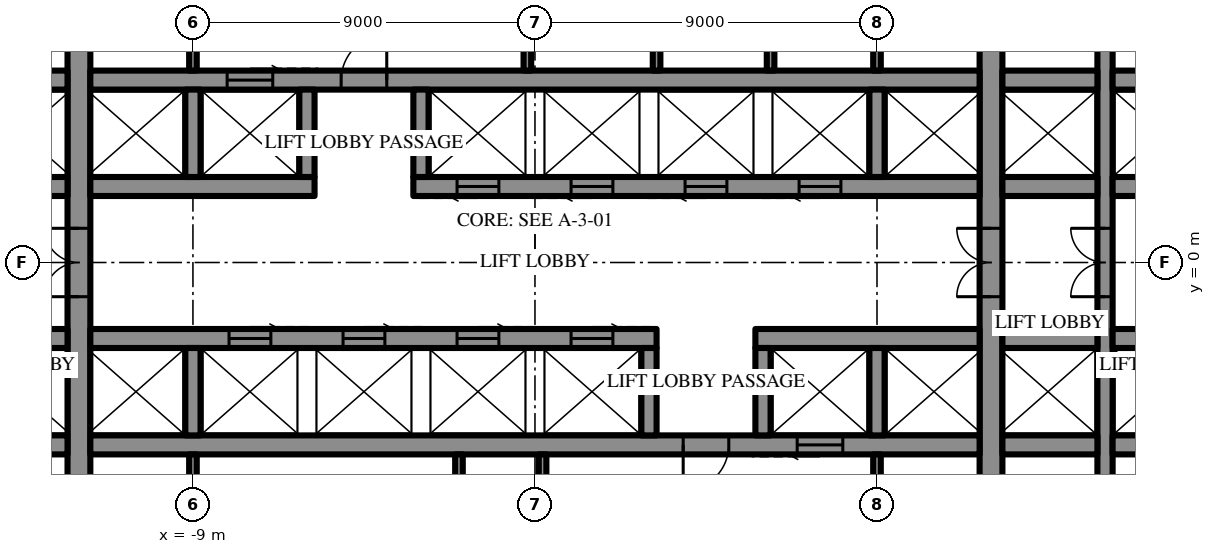
"""IFC4 building model, lengths in metres.
Left out: names, types, materials, properties, quantities, classifications, styles, units other than length and angle.
Written with IfcOpenShell. Run it as: python <this file> out.ifc"""

import sys

from ifc_helpers import new_model, si_unit, direction, frame, frame_2d, origin, place, context, subcontext, project, spatial, rectangle, extrude, element, fill, save


model = new_model("IFC4")
c1 = context("Model", 3, precision=1e-05, world=origin(), true_north=direction((0.0, 1.0)))
c2 = subcontext(c1, "Body", "Model", "MODEL_VIEW")
j1 = project(units=[si_unit("LENGTHUNIT", "METRE"), si_unit("PLANEANGLEUNIT", "RADIAN")], contexts=[c1])
p1 = place(None, origin())
s1 = spatial("IfcSite", under=j1, at=p1, CompositionType="ELEMENT")
p2 = place(p1, origin())
s2 = spatial("IfcBuilding", under=s1, at=p2, CompositionType="ELEMENT")
p3 = place(p2, frame((0.0, 0.0, 61.3)))
s3 = spatial("IfcBuildingStorey", under=s2, at=p3, CompositionType="ELEMENT", Elevation=61.3)
p4 = place(p3, frame((12.0, -10.7, 0.0), z_axis=(0.0, 0.0, 1.0), x_axis=(0.0, 1.0, 0.0)))
e1 = element("IfcWall", 1, at=p4, inside=s3, PredefinedType="SHEAR", context=c2, shape_type="SweptSolid", body=[
    extrude(rectangle(XDim=21.4, YDim=0.6, at=frame_2d((10.7, 0.0))), origin(), (0.0, 0.0, 1.0), 4.2),
])
p5 = place(p4, frame((9.8, 0.0, 0.0)))
e2 = element("IfcOpeningElement", 2, at=p5, cuts=e1, PredefinedType="OPENING", context=c2, shape_type="SweptSolid", body=[
    extrude(rectangle(XDim=1.8, YDim=2.4, at=frame_2d((0.9, 1.2))), frame((0.0, 0.31, 0.0), z_axis=(0.0, -1.0, 0.0), x_axis=(1.0, 0.0, 0.0)), (0.0, 0.0, 1.0), 0.62),
])
p6 = place(p3, frame((-12.0, -10.7, 0.0), z_axis=(0.0, 0.0, 1.0), x_axis=(0.0, 1.0, 0.0)))
e3 = element("IfcWall", 3, at=p6, inside=s3, PredefinedType="SHEAR", context=c2, shape_type="SweptSolid", body=[
    extrude(rectangle(XDim=21.4, YDim=0.6, at=frame_2d((10.7, 0.0))), origin(), (0.0, 0.0, 1.0), 4.2),
])
p7 = place(p6, frame((9.8, 0.0, 0.0)))
e4 = element("IfcOpeningElement", 4, at=p7, cuts=e3, PredefinedType="OPENING", context=c2, shape_type="SweptSolid", body=[
    extrude(rectangle(XDim=1.8, YDim=2.4, at=frame_2d((0.9, 1.2))), frame((0.0, 0.31, 0.0), z_axis=(0.0, -1.0, 0.0), x_axis=(1.0, 0.0, 0.0)), (0.0, 0.0, 1.0), 0.62),
])
p8 = place(p3, frame((15.0, -10.7, 0.0), z_axis=(0.0, 0.0, 1.0), x_axis=(0.0, 1.0, 0.0)))
e5 = element("IfcWall", 5, at=p8, inside=s3, PredefinedType="SHEAR", context=c2, shape_type="SweptSolid", body=[
    extrude(rectangle(XDim=21.4, YDim=0.4, at=frame_2d((10.7, 0.0))), origin(), (0.0, 0.0, 1.0), 4.2),
])
p9 = place(p8, frame((9.8, 0.0, 0.0)))
e6 = element("IfcOpeningElement", 6, at=p9, cuts=e5, PredefinedType="OPENING", context=c2, shape_type="SweptSolid", body=[
    extrude(rectangle(XDim=1.8, YDim=2.4, at=frame_2d((0.9, 1.2))), frame((0.0, 0.21, 0.0), z_axis=(0.0, -1.0, 0.0), x_axis=(1.0, 0.0, 0.0)), (0.0, 0.0, 1.0), 0.42),
])
p10 = place(p3, frame((-14.8, 2.0, 0.0), z_axis=(0.0, 0.0, 1.0), x_axis=(1.0, 0.0, 0.0)))
e7 = element("IfcWall", 7, at=p10, inside=s3, PredefinedType="SHEAR", context=c2, shape_type="SweptSolid", body=[
    extrude(rectangle(XDim=2.5, YDim=0.5, at=frame_2d((1.25, 0.0))), origin(), (0.0, 0.0, 1.0), 4.2),
])
p11 = place(p3, frame((-11.7, 2.0, 0.0), z_axis=(0.0, 0.0, 1.0), x_axis=(1.0, 0.0, 0.0)))
e8 = element("IfcWall", 8, at=p11, inside=s3, PredefinedType="SHEAR", context=c2, shape_type="SweptSolid", body=[
    extrude(rectangle(XDim=5.9, YDim=0.5, at=frame_2d((2.95, 0.0))), origin(), (0.0, 0.0, 1.0), 4.2),
])
p12 = place(p3, frame((-3.2, 2.0, 0.0), z_axis=(0.0, 0.0, 1.0), x_axis=(1.0, 0.0, 0.0)))
e9 = element("IfcWall", 9, at=p12, inside=s3, PredefinedType="SHEAR", context=c2, shape_type="SweptSolid", body=[
    extrude(rectangle(XDim=14.9, YDim=0.5, at=frame_2d((7.45, 0.0))), origin(), (0.0, 0.0, 1.0), 4.2),
])
p13 = place(p12, frame((1.15, 0.0, 0.0)))
e10 = element("IfcOpeningElement", 10, at=p13, cuts=e9, PredefinedType="OPENING", context=c2, shape_type="SweptSolid", body=[
    extrude(rectangle(XDim=1.1, YDim=2.2, at=frame_2d((0.55, 1.1))), frame((0.0, 0.26, 0.0), z_axis=(0.0, -1.0, 0.0), x_axis=(1.0, 0.0, 0.0)), (0.0, 0.0, 1.0), 0.52),
])
p14 = place(p12, frame((4.15, 0.0, 0.0)))
e11 = element("IfcOpeningElement", 11, at=p14, cuts=e9, PredefinedType="OPENING", context=c2, shape_type="SweptSolid", body=[
    extrude(rectangle(XDim=1.1, YDim=2.2, at=frame_2d((0.55, 1.1))), frame((0.0, 0.26, 0.0), z_axis=(0.0, -1.0, 0.0), x_axis=(1.0, 0.0, 0.0)), (0.0, 0.0, 1.0), 0.52),
])
p15 = place(p12, frame((7.15, 0.0, 0.0)))
e12 = element("IfcOpeningElement", 12, at=p15, cuts=e9, PredefinedType="OPENING", context=c2, shape_type="SweptSolid", body=[
    extrude(rectangle(XDim=1.1, YDim=2.2, at=frame_2d((0.55, 1.1))), frame((0.0, 0.26, 0.0), z_axis=(0.0, -1.0, 0.0), x_axis=(1.0, 0.0, 0.0)), (0.0, 0.0, 1.0), 0.52),
])
p16 = place(p12, frame((10.15, 0.0, 0.0)))
e13 = element("IfcOpeningElement", 13, at=p16, cuts=e9, PredefinedType="OPENING", context=c2, shape_type="SweptSolid", body=[
    extrude(rectangle(XDim=1.1, YDim=2.2, at=frame_2d((0.55, 1.1))), frame((0.0, 0.26, 0.0), z_axis=(0.0, -1.0, 0.0), x_axis=(1.0, 0.0, 0.0)), (0.0, 0.0, 1.0), 0.52),
])
p17 = place(p3, frame((12.3, 2.0, 0.0), z_axis=(0.0, 0.0, 1.0), x_axis=(1.0, 0.0, 0.0)))
e14 = element("IfcWall", 14, at=p17, inside=s3, PredefinedType="SHEAR", context=c2, shape_type="SweptSolid", body=[
    extrude(rectangle(XDim=2.5, YDim=0.5, at=frame_2d((1.25, 0.0))), origin(), (0.0, 0.0, 1.0), 4.2),
])
p18 = place(p3, frame((15.2, 2.0, 0.0), z_axis=(0.0, 0.0, 1.0), x_axis=(1.0, 0.0, 0.0)))
e15 = element("IfcWall", 15, at=p18, inside=s3, PredefinedType="SHEAR", context=c2, shape_type="SweptSolid", body=[
    extrude(rectangle(XDim=2.2, YDim=0.5, at=frame_2d((1.1, 0.0))), origin(), (0.0, 0.0, 1.0), 4.2),
])
p19 = place(p3, frame((-14.8, 4.8, 0.0), z_axis=(0.0, 0.0, 1.0), x_axis=(1.0, 0.0, 0.0)))
e16 = element("IfcWall", 16, at=p19, inside=s3, PredefinedType="SHEAR", context=c2, shape_type="SweptSolid", body=[
    extrude(rectangle(XDim=2.5, YDim=0.5, at=frame_2d((1.25, 0.0))), origin(), (0.0, 0.0, 1.0), 4.2),
])
p20 = place(p3, frame((-11.7, 4.8, 0.0), z_axis=(0.0, 0.0, 1.0), x_axis=(1.0, 0.0, 0.0)))
e17 = element("IfcWall", 17, at=p20, inside=s3, PredefinedType="SHEAR", context=c2, shape_type="SweptSolid", body=[
    extrude(rectangle(XDim=23.4, YDim=0.5, at=frame_2d((11.7, 0.0))), origin(), (0.0, 0.0, 1.0), 4.2),
])
p21 = place(p20, frame((6.6, 0.0, 0.0)))
e18 = element("IfcOpeningElement", 18, at=p21, cuts=e17, PredefinedType="OPENING", context=c2, shape_type="SweptSolid", body=[
    extrude(rectangle(XDim=1.2, YDim=2.2, at=frame_2d((0.6, 1.1))), frame((0.0, 0.26, 0.0), z_axis=(0.0, -1.0, 0.0), x_axis=(1.0, 0.0, 0.0)), (0.0, 0.0, 1.0), 0.52),
])
p22 = place(p20, frame((3.6, 0.0, 0.0)))
e19 = element("IfcOpeningElement", 19, at=p22, cuts=e17, PredefinedType="OPENING", context=c2, shape_type="SweptSolid", body=[
    extrude(rectangle(XDim=1.2, YDim=2.2, at=frame_2d((0.6, 1.1))), frame((0.0, 0.26, 0.0), z_axis=(0.0, -1.0, 0.0), x_axis=(1.0, 0.0, 0.0)), (0.0, 0.0, 1.0), 0.52),
])
p23 = place(p3, frame((12.3, 4.8, 0.0), z_axis=(0.0, 0.0, 1.0), x_axis=(1.0, 0.0, 0.0)))
e20 = element("IfcWall", 20, at=p23, inside=s3, PredefinedType="SHEAR", context=c2, shape_type="SweptSolid", body=[
    extrude(rectangle(XDim=2.5, YDim=0.5, at=frame_2d((1.25, 0.0))), origin(), (0.0, 0.0, 1.0), 4.2),
])
p24 = place(p3, frame((15.2, 4.8, 0.0), z_axis=(0.0, 0.0, 1.0), x_axis=(1.0, 0.0, 0.0)))
e21 = element("IfcWall", 21, at=p24, inside=s3, PredefinedType="SHEAR", context=c2, shape_type="SweptSolid", body=[
    extrude(rectangle(XDim=2.2, YDim=0.5, at=frame_2d((1.1, 0.0))), origin(), (0.0, 0.0, 1.0), 4.2),
])
for number, where, z_axis, x_axis in (
    (22, (-9.0, 2.25, 0.0), (0.0, 0.0, 1.0), (0.0, 1.0, 0.0)),
    (23, (-6.0, 2.25, 0.0), (0.0, 0.0, 1.0), (0.0, 1.0, 0.0)),
    (24, (-3.0, 2.25, 0.0), (0.0, 0.0, 1.0), (0.0, 1.0, 0.0)),
    (25, (9.0, 2.25, 0.0), (0.0, 0.0, 1.0), (0.0, 1.0, 0.0)),
):
    element("IfcWall", number, at=place(p3, frame(where, z_axis=z_axis, x_axis=x_axis)), inside=s3, PredefinedType="SHEAR", context=c2, shape_type="SweptSolid", body=[
        extrude(rectangle(XDim=2.3, YDim=0.4, at=frame_2d((1.15, 0.0))), origin(), (0.0, 0.0, 1.0), 4.2),
    ])
p25 = place(p3, frame((-0.2, 5.05, 0.0), z_axis=(0.0, 0.0, 1.0), x_axis=(0.0, 1.0, 0.0)))
e26 = element("IfcWall", 26, at=p25, inside=s3, PredefinedType="SHEAR", context=c2, shape_type="SweptSolid", body=[
    extrude(rectangle(XDim=5.65, YDim=0.2, at=frame_2d((2.825, 0.0))), origin(), (0.0, 0.0, 1.0), 4.2),
])
p26 = place(p3, frame((17.4, -2.0, 0.0), z_axis=(0.0, 0.0, 1.0), x_axis=(-1.0, 0.0, 0.0)))
e27 = element("IfcWall", 27, at=p26, inside=s3, PredefinedType="SHEAR", context=c2, shape_type="SweptSolid", body=[
    extrude(rectangle(XDim=2.2, YDim=0.5, at=frame_2d((1.1, 0.0))), origin(), (0.0, 0.0, 1.0), 4.2),
])
p27 = place(p3, frame((14.8, -2.0, 0.0), z_axis=(0.0, 0.0, 1.0), x_axis=(-1.0, 0.0, 0.0)))
e28 = element("IfcWall", 28, at=p27, inside=s3, PredefinedType="SHEAR", context=c2, shape_type="SweptSolid", body=[
    extrude(rectangle(XDim=2.5, YDim=0.5, at=frame_2d((1.25, 0.0))), origin(), (0.0, 0.0, 1.0), 4.2),
])
p28 = place(p3, frame((11.7, -2.0, 0.0), z_axis=(0.0, 0.0, 1.0), x_axis=(-1.0, 0.0, 0.0)))
e29 = element("IfcWall", 29, at=p28, inside=s3, PredefinedType="SHEAR", context=c2, shape_type="SweptSolid", body=[
    extrude(rectangle(XDim=5.9, YDim=0.5, at=frame_2d((2.95, 0.0))), origin(), (0.0, 0.0, 1.0), 4.2),
])
p29 = place(p3, frame((3.2, -2.0, 0.0), z_axis=(0.0, 0.0, 1.0), x_axis=(-1.0, 0.0, 0.0)))
e30 = element("IfcWall", 30, at=p29, inside=s3, PredefinedType="SHEAR", context=c2, shape_type="SweptSolid", body=[
    extrude(rectangle(XDim=14.9, YDim=0.5, at=frame_2d((7.45, 0.0))), origin(), (0.0, 0.0, 1.0), 4.2),
])
p30 = place(p29, frame((1.15, 0.0, 0.0)))
e31 = element("IfcOpeningElement", 31, at=p30, cuts=e30, PredefinedType="OPENING", context=c2, shape_type="SweptSolid", body=[
    extrude(rectangle(XDim=1.1, YDim=2.2, at=frame_2d((0.55, 1.1))), frame((0.0, 0.26, 0.0), z_axis=(0.0, -1.0, 0.0), x_axis=(1.0, 0.0, 0.0)), (0.0, 0.0, 1.0), 0.52),
])
p31 = place(p29, frame((4.15, 0.0, 0.0)))
e32 = element("IfcOpeningElement", 32, at=p31, cuts=e30, PredefinedType="OPENING", context=c2, shape_type="SweptSolid", body=[
    extrude(rectangle(XDim=1.1, YDim=2.2, at=frame_2d((0.55, 1.1))), frame((0.0, 0.26, 0.0), z_axis=(0.0, -1.0, 0.0), x_axis=(1.0, 0.0, 0.0)), (0.0, 0.0, 1.0), 0.52),
])
p32 = place(p29, frame((7.15, 0.0, 0.0)))
e33 = element("IfcOpeningElement", 33, at=p32, cuts=e30, PredefinedType="OPENING", context=c2, shape_type="SweptSolid", body=[
    extrude(rectangle(XDim=1.1, YDim=2.2, at=frame_2d((0.55, 1.1))), frame((0.0, 0.26, 0.0), z_axis=(0.0, -1.0, 0.0), x_axis=(1.0, 0.0, 0.0)), (0.0, 0.0, 1.0), 0.52),
])
p33 = place(p29, frame((10.15, 0.0, 0.0)))
e34 = element("IfcOpeningElement", 34, at=p33, cuts=e30, PredefinedType="OPENING", context=c2, shape_type="SweptSolid", body=[
    extrude(rectangle(XDim=1.1, YDim=2.2, at=frame_2d((0.55, 1.1))), frame((0.0, 0.26, 0.0), z_axis=(0.0, -1.0, 0.0), x_axis=(1.0, 0.0, 0.0)), (0.0, 0.0, 1.0), 0.52),
])
p34 = place(p3, frame((-12.3, -2.0, 0.0), z_axis=(0.0, 0.0, 1.0), x_axis=(-1.0, 0.0, 0.0)))
e35 = element("IfcWall", 35, at=p34, inside=s3, PredefinedType="SHEAR", context=c2, shape_type="SweptSolid", body=[
    extrude(rectangle(XDim=2.5, YDim=0.5, at=frame_2d((1.25, 0.0))), origin(), (0.0, 0.0, 1.0), 4.2),
])
p35 = place(p3, frame((17.4, -4.8, 0.0), z_axis=(0.0, 0.0, 1.0), x_axis=(-1.0, 0.0, 0.0)))
e36 = element("IfcWall", 36, at=p35, inside=s3, PredefinedType="SHEAR", context=c2, shape_type="SweptSolid", body=[
    extrude(rectangle(XDim=2.2, YDim=0.5, at=frame_2d((1.1, 0.0))), origin(), (0.0, 0.0, 1.0), 4.2),
])
p36 = place(p3, frame((14.8, -4.8, 0.0), z_axis=(0.0, 0.0, 1.0), x_axis=(-1.0, 0.0, 0.0)))
e37 = element("IfcWall", 37, at=p36, inside=s3, PredefinedType="SHEAR", context=c2, shape_type="SweptSolid", body=[
    extrude(rectangle(XDim=2.5, YDim=0.5, at=frame_2d((1.25, 0.0))), origin(), (0.0, 0.0, 1.0), 4.2),
])
p37 = place(p3, frame((11.7, -4.8, 0.0), z_axis=(0.0, 0.0, 1.0), x_axis=(-1.0, 0.0, 0.0)))
e38 = element("IfcWall", 38, at=p37, inside=s3, PredefinedType="SHEAR", context=c2, shape_type="SweptSolid", body=[
    extrude(rectangle(XDim=23.4, YDim=0.5, at=frame_2d((11.7, 0.0))), origin(), (0.0, 0.0, 1.0), 4.2),
])
p38 = place(p37, frame((6.6, 0.0, 0.0)))
e39 = element("IfcOpeningElement", 39, at=p38, cuts=e38, PredefinedType="OPENING", context=c2, shape_type="SweptSolid", body=[
    extrude(rectangle(XDim=1.2, YDim=2.2, at=frame_2d((0.6, 1.1))), frame((0.0, 0.26, 0.0), z_axis=(0.0, -1.0, 0.0), x_axis=(1.0, 0.0, 0.0)), (0.0, 0.0, 1.0), 0.52),
])
p39 = place(p37, frame((3.6, 0.0, 0.0)))
e40 = element("IfcOpeningElement", 40, at=p39, cuts=e38, PredefinedType="OPENING", context=c2, shape_type="SweptSolid", body=[
    extrude(rectangle(XDim=1.2, YDim=2.2, at=frame_2d((0.6, 1.1))), frame((0.0, 0.26, 0.0), z_axis=(0.0, -1.0, 0.0), x_axis=(1.0, 0.0, 0.0)), (0.0, 0.0, 1.0), 0.52),
])
p40 = place(p3, frame((-12.3, -4.8, 0.0), z_axis=(0.0, 0.0, 1.0), x_axis=(-1.0, 0.0, 0.0)))
e41 = element("IfcWall", 41, at=p40, inside=s3, PredefinedType="SHEAR", context=c2, shape_type="SweptSolid", body=[
    extrude(rectangle(XDim=2.5, YDim=0.5, at=frame_2d((1.25, 0.0))), origin(), (0.0, 0.0, 1.0), 4.2),
])
for number, where, z_axis, x_axis in (
    (42, (9.0, -2.25, 0.0), (0.0, 0.0, 1.0), (0.0, -1.0, 0.0)),
    (43, (6.0, -2.25, 0.0), (0.0, 0.0, 1.0), (0.0, -1.0, 0.0)),
    (44, (3.0, -2.25, 0.0), (0.0, 0.0, 1.0), (0.0, -1.0, 0.0)),
    (45, (-9.0, -2.25, 0.0), (0.0, 0.0, 1.0), (0.0, -1.0, 0.0)),
):
    element("IfcWall", number, at=place(p3, frame(where, z_axis=z_axis, x_axis=x_axis)), inside=s3, PredefinedType="SHEAR", context=c2, shape_type="SweptSolid", body=[
        extrude(rectangle(XDim=2.3, YDim=0.4, at=frame_2d((1.15, 0.0))), origin(), (0.0, 0.0, 1.0), 4.2),
    ])
p41 = place(p3, frame((0.2, -5.05, 0.0), z_axis=(0.0, 0.0, 1.0), x_axis=(0.0, -1.0, 0.0)))
e46 = element("IfcWall", 46, at=p41, inside=s3, PredefinedType="SHEAR", context=c2, shape_type="SweptSolid", body=[
    extrude(rectangle(XDim=5.65, YDim=0.2, at=frame_2d((2.825, 0.0))), origin(), (0.0, 0.0, 1.0), 4.2),
])
for number, where, z_axis, x_axis in (
    (47, (-9.0, 5.05, 0.0), (0.0, 0.0, 1.0), (0.0, 1.0, 0.0)),
    (48, (9.0, 5.05, 0.0), (0.0, 0.0, 1.0), (0.0, 1.0, 0.0)),
    (49, (3.2, 5.05, 0.0), (0.0, 0.0, 1.0), (0.0, 1.0, 0.0)),
    (50, (6.2, 5.05, 0.0), (0.0, 0.0, 1.0), (0.0, 1.0, 0.0)),
    (51, (9.0, -5.05, 0.0), (0.0, 0.0, 1.0), (0.0, -1.0, 0.0)),
    (52, (-9.0, -5.05, 0.0), (0.0, 0.0, 1.0), (0.0, -1.0, 0.0)),
    (53, (-2.0, -5.05, 0.0), (0.0, 0.0, 1.0), (0.0, -1.0, 0.0)),
):
    element("IfcWall", number, at=place(p3, frame(where, z_axis=z_axis, x_axis=x_axis)), inside=s3, PredefinedType="PARTITIONING", context=c2, shape_type="SweptSolid", body=[
        extrude(rectangle(XDim=5.65, YDim=0.2, at=frame_2d((2.825, 0.0))), origin(), (0.0, 0.0, 1.0), 4.0),
    ])
p42 = place(p21, origin())
e54 = element("IfcDoor", 54, at=p42, inside=s3, OperationType="SINGLE_SWING_LEFT", PredefinedType="DOOR", context=c2, shape_type="SweptSolid", body=[
    extrude(rectangle(XDim=1.2, YDim=2.2, at=frame_2d((0.6, 1.1))), frame((0.0, 0.025, 0.0), z_axis=(0.0, -1.0, 0.0), x_axis=(1.0, 0.0, 0.0)), (0.0, 0.0, 1.0), 0.05),
])
fill(e18, e54)
p43 = place(p38, origin())
e55 = element("IfcDoor", 55, at=p43, inside=s3, OperationType="SINGLE_SWING_LEFT", PredefinedType="DOOR", context=c2, shape_type="SweptSolid", body=[
    extrude(rectangle(XDim=1.2, YDim=2.2, at=frame_2d((0.6, 1.1))), frame((0.0, 0.025, 0.0), z_axis=(0.0, -1.0, 0.0), x_axis=(1.0, 0.0, 0.0)), (0.0, 0.0, 1.0), 0.05),
])
fill(e39, e55)
p44 = place(p5, origin())
e56 = element("IfcDoor", 56, at=p44, inside=s3, OperationType="DOUBLE_DOOR_SINGLE_SWING", PredefinedType="DOOR", context=c2, shape_type="SweptSolid", body=[
    extrude(rectangle(XDim=1.8, YDim=2.4, at=frame_2d((0.9, 1.2))), frame((0.0, 0.025, 0.0), z_axis=(0.0, -1.0, 0.0), x_axis=(1.0, 0.0, 0.0)), (0.0, 0.0, 1.0), 0.05),
])
fill(e2, e56)
p45 = place(p7, origin())
e57 = element("IfcDoor", 57, at=p45, inside=s3, OperationType="DOUBLE_DOOR_SINGLE_SWING", PredefinedType="DOOR", context=c2, shape_type="SweptSolid", body=[
    extrude(rectangle(XDim=1.8, YDim=2.4, at=frame_2d((0.9, 1.2))), frame((0.0, 0.025, 0.0), z_axis=(0.0, -1.0, 0.0), x_axis=(1.0, 0.0, 0.0)), (0.0, 0.0, 1.0), 0.05),
])
fill(e4, e57)
p46 = place(p9, origin())
e58 = element("IfcDoor", 58, at=p46, inside=s3, OperationType="DOUBLE_DOOR_SINGLE_SWING", PredefinedType="DOOR", context=c2, shape_type="SweptSolid", body=[
    extrude(rectangle(XDim=1.8, YDim=2.4, at=frame_2d((0.9, 1.2))), frame((0.0, 0.025, 0.0), z_axis=(0.0, -1.0, 0.0), x_axis=(1.0, 0.0, 0.0)), (0.0, 0.0, 1.0), 0.05),
])
fill(e6, e58)
p47 = place(p22, origin())
e59 = element("IfcDoor", 59, at=p47, inside=s3, OperationType="SLIDING_TO_LEFT", PredefinedType="DOOR", context=c2, shape_type="SweptSolid", body=[
    extrude(rectangle(XDim=1.2, YDim=2.2, at=frame_2d((0.6, 1.1))), frame((0.0, 0.025, 0.0), z_axis=(0.0, -1.0, 0.0), x_axis=(1.0, 0.0, 0.0)), (0.0, 0.0, 1.0), 0.05),
])
fill(e19, e59)
p48 = place(p13, frame((1.1, 0.0, 0.0), z_axis=(0.0, 0.0, 1.0), x_axis=(-1.0, 0.0, 0.0)))
e60 = element("IfcDoor", 60, at=p48, inside=s3, OperationType="SLIDING_TO_LEFT", PredefinedType="DOOR", context=c2, shape_type="SweptSolid", body=[
    extrude(rectangle(XDim=1.1, YDim=2.2, at=frame_2d((0.55, 1.1))), frame((0.0, 0.025, 0.0), z_axis=(0.0, -1.0, 0.0), x_axis=(1.0, 0.0, 0.0)), (0.0, 0.0, 1.0), 0.05),
])
fill(e10, e60)
p49 = place(p14, frame((1.1, 0.0, 0.0), z_axis=(0.0, 0.0, 1.0), x_axis=(-1.0, 0.0, 0.0)))
e61 = element("IfcDoor", 61, at=p49, inside=s3, OperationType="SLIDING_TO_LEFT", PredefinedType="DOOR", context=c2, shape_type="SweptSolid", body=[
    extrude(rectangle(XDim=1.1, YDim=2.2, at=frame_2d((0.55, 1.1))), frame((0.0, 0.025, 0.0), z_axis=(0.0, -1.0, 0.0), x_axis=(1.0, 0.0, 0.0)), (0.0, 0.0, 1.0), 0.05),
])
fill(e11, e61)
p50 = place(p15, frame((1.1, 0.0, 0.0), z_axis=(0.0, 0.0, 1.0), x_axis=(-1.0, 0.0, 0.0)))
e62 = element("IfcDoor", 62, at=p50, inside=s3, OperationType="SLIDING_TO_LEFT", PredefinedType="DOOR", context=c2, shape_type="SweptSolid", body=[
    extrude(rectangle(XDim=1.1, YDim=2.2, at=frame_2d((0.55, 1.1))), frame((0.0, 0.025, 0.0), z_axis=(0.0, -1.0, 0.0), x_axis=(1.0, 0.0, 0.0)), (0.0, 0.0, 1.0), 0.05),
])
fill(e12, e62)
p51 = place(p16, frame((1.1, 0.0, 0.0), z_axis=(0.0, 0.0, 1.0), x_axis=(-1.0, 0.0, 0.0)))
e63 = element("IfcDoor", 63, at=p51, inside=s3, OperationType="SLIDING_TO_LEFT", PredefinedType="DOOR", context=c2, shape_type="SweptSolid", body=[
    extrude(rectangle(XDim=1.1, YDim=2.2, at=frame_2d((0.55, 1.1))), frame((0.0, 0.025, 0.0), z_axis=(0.0, -1.0, 0.0), x_axis=(1.0, 0.0, 0.0)), (0.0, 0.0, 1.0), 0.05),
])
fill(e13, e63)
p52 = place(p39, origin())
e64 = element("IfcDoor", 64, at=p52, inside=s3, OperationType="SLIDING_TO_LEFT", PredefinedType="DOOR", context=c2, shape_type="SweptSolid", body=[
    extrude(rectangle(XDim=1.2, YDim=2.2, at=frame_2d((0.6, 1.1))), frame((0.0, 0.025, 0.0), z_axis=(0.0, -1.0, 0.0), x_axis=(1.0, 0.0, 0.0)), (0.0, 0.0, 1.0), 0.05),
])
fill(e40, e64)
p53 = place(p30, frame((1.1, 0.0, 0.0), z_axis=(0.0, 0.0, 1.0), x_axis=(-1.0, 0.0, 0.0)))
e65 = element("IfcDoor", 65, at=p53, inside=s3, OperationType="SLIDING_TO_LEFT", PredefinedType="DOOR", context=c2, shape_type="SweptSolid", body=[
    extrude(rectangle(XDim=1.1, YDim=2.2, at=frame_2d((0.55, 1.1))), frame((0.0, 0.025, 0.0), z_axis=(0.0, -1.0, 0.0), x_axis=(1.0, 0.0, 0.0)), (0.0, 0.0, 1.0), 0.05),
])
fill(e31, e65)
p54 = place(p31, frame((1.1, 0.0, 0.0), z_axis=(0.0, 0.0, 1.0), x_axis=(-1.0, 0.0, 0.0)))
e66 = element("IfcDoor", 66, at=p54, inside=s3, OperationType="SLIDING_TO_LEFT", PredefinedType="DOOR", context=c2, shape_type="SweptSolid", body=[
    extrude(rectangle(XDim=1.1, YDim=2.2, at=frame_2d((0.55, 1.1))), frame((0.0, 0.025, 0.0), z_axis=(0.0, -1.0, 0.0), x_axis=(1.0, 0.0, 0.0)), (0.0, 0.0, 1.0), 0.05),
])
fill(e32, e66)
p55 = place(p32, frame((1.1, 0.0, 0.0), z_axis=(0.0, 0.0, 1.0), x_axis=(-1.0, 0.0, 0.0)))
e67 = element("IfcDoor", 67, at=p55, inside=s3, OperationType="SLIDING_TO_LEFT", PredefinedType="DOOR", context=c2, shape_type="SweptSolid", body=[
    extrude(rectangle(XDim=1.1, YDim=2.2, at=frame_2d((0.55, 1.1))), frame((0.0, 0.025, 0.0), z_axis=(0.0, -1.0, 0.0), x_axis=(1.0, 0.0, 0.0)), (0.0, 0.0, 1.0), 0.05),
])
fill(e33, e67)
p56 = place(p33, frame((1.1, 0.0, 0.0), z_axis=(0.0, 0.0, 1.0), x_axis=(-1.0, 0.0, 0.0)))
e68 = element("IfcDoor", 68, at=p56, inside=s3, OperationType="SLIDING_TO_LEFT", PredefinedType="DOOR", context=c2, shape_type="SweptSolid", body=[
    extrude(rectangle(XDim=1.1, YDim=2.2, at=frame_2d((0.55, 1.1))), frame((0.0, 0.025, 0.0), z_axis=(0.0, -1.0, 0.0), x_axis=(1.0, 0.0, 0.0)), (0.0, 0.0, 1.0), 0.05),
])
fill(e34, e68)
save(model, sys.argv[1])
